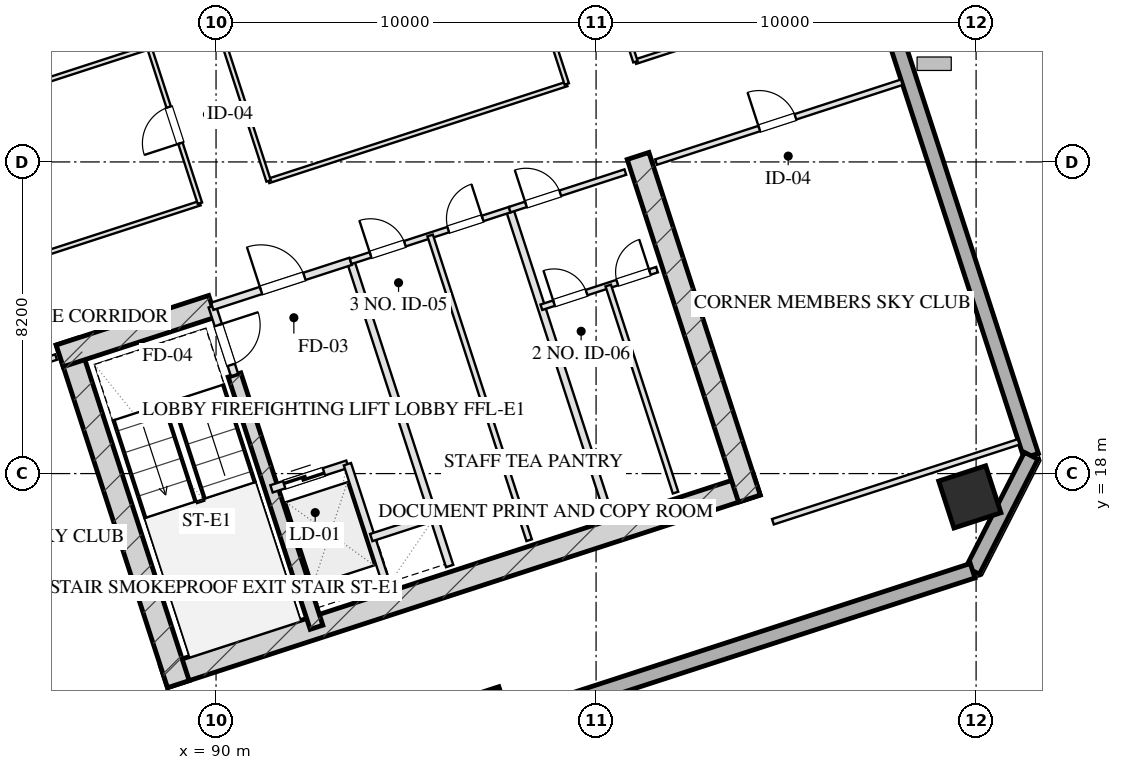
"""IFC4 building model, lengths in metres.
Left out: names, types, materials, properties, quantities, classifications, styles, units other than length and angle.
Written with IfcOpenShell. Run it as: python <this file> out.ifc"""

import sys

from ifc_helpers import new_model, si_unit, direction, frame, frame_2d, origin, origin_2d, place, context, subcontext, project, spatial, rectangle, hollow_rectangle, extrude, element, fill, save


model = new_model("IFC4")
c1 = context("Model", 3, precision=1e-05, world=origin(), true_north=direction((0.0, 1.0)))
c2 = subcontext(c1, "Body", "Model", "MODEL_VIEW")
j1 = project(units=[si_unit("LENGTHUNIT", "METRE"), si_unit("PLANEANGLEUNIT", "RADIAN")], contexts=[c1])
p1 = place(None, origin())
s1 = spatial("IfcSite", under=j1, at=p1, CompositionType="ELEMENT")
p2 = place(p1, origin())
s2 = spatial("IfcBuilding", under=s1, at=p2, CompositionType="ELEMENT")
p3 = place(p2, frame((0.0, 0.0, 152.95)))
s3 = spatial("IfcBuildingStorey", under=s2, at=p3, CompositionType="ELEMENT", Elevation=152.95)
p4 = place(p3, frame((88.63, 12.652, 0.0), z_axis=(0.0, 0.0, 1.0), x_axis=(0.95105714907, 0.309015046886, 0.0)))
e1 = element("IfcWall", 1, at=p4, inside=s3, PredefinedType="SHEAR", context=c2, shape_type="SweptSolid", body=[
    extrude(rectangle(XDim=16.4, YDim=0.6, at=frame_2d((8.2, 0.0))), origin(), (0.0, 0.0, 1.0), 3.45),
])
p5 = place(p3, frame((86.078, 21.475, 0.0), z_axis=(0.0, 0.0, 1.0), x_axis=(0.309017938678, -0.951056209472, 0.0)))
e2 = element("IfcWall", 2, at=p5, inside=s3, PredefinedType="SHEAR", context=c2, shape_type="SweptSolid", body=[
    extrude(rectangle(XDim=9.48, YDim=0.6, at=frame_2d((4.74, 0.0))), origin(), (0.0, 0.0, 1.0), 3.45),
])
p6 = place(p3, frame((101.105, 26.358, 0.0), z_axis=(0.0, 0.0, 1.0), x_axis=(0.309010370028, -0.95105866865, 0.0)))
e3 = element("IfcWall", 3, at=p6, inside=s3, PredefinedType="SHEAR", context=c2, shape_type="SweptSolid", body=[
    extrude(rectangle(XDim=9.48, YDim=0.6, at=frame_2d((4.74, 0.0))), origin(), (0.0, 0.0, 1.0), 3.45),
])
p7 = place(p3, frame((90.486, 20.594, 0.0), z_axis=(0.0, 0.0, 1.0), x_axis=(0.309020428229, -0.951055400562, 0.0)))
e4 = element("IfcWall", 4, at=p7, inside=s3, PredefinedType="SHEAR", context=c2, shape_type="SweptSolid", body=[
    extrude(rectangle(XDim=6.98, YDim=0.35, at=frame_2d((3.49, 0.0))), origin(), (0.0, 0.0, 1.0), 3.45),
])
p8 = place(p3, frame((85.886, 21.097, 0.0), z_axis=(0.0, 0.0, 1.0), x_axis=(0.951068073652, 0.308981422225, 0.0)))
e5 = element("IfcWall", 5, at=p8, inside=s3, PredefinedType="SHEAR", context=c2, shape_type="SweptSolid", body=[
    extrude(rectangle(XDim=4.22, YDim=0.6, at=frame_2d((2.11, 0.0))), origin(), (0.0, 0.0, 1.0), 3.45),
])
p9 = place(p3, frame((109.835, 17.386, 0.0), z_axis=(0.0, 0.0, 1.0), x_axis=(0.951056516295, 0.309016994375, 0.0)))
e6 = element("IfcColumn", 6, at=p9, inside=s3, PredefinedType="COLUMN", context=c2, shape_type="SweptSolid", body=[
    extrude(hollow_rectangle(XDim=1.3, YDim=1.3, WallThickness=0.045, at=origin_2d()), origin(), (0.0, 0.0, 1.0), 3.451),
])
p10 = place(p3, frame((97.185, 11.888, 0.0), z_axis=(0.0, 0.0, 1.0), x_axis=(0.951056516295, 0.309016994375, 0.0)))
e7 = element("IfcColumn", 7, at=p10, inside=s3, PredefinedType="COLUMN", context=c2, shape_type="SweptSolid", body=[
    extrude(hollow_rectangle(XDim=0.8, YDim=0.8, WallThickness=0.028, at=origin_2d()), origin(), (0.0, 0.0, 1.0), 3.451),
])
p11 = place(p3, frame((98.224, 59.173, 0.0), z_axis=(0.0, 0.0, 1.0), x_axis=(0.309014228706, -0.951057414911, 0.0)))
e8 = element("IfcWall", 8, at=p11, inside=s3, PredefinedType="SOLIDWALL", context=c2, shape_type="SweptSolid", body=[
    extrude(rectangle(XDim=42.8, YDim=0.4, at=frame_2d((21.4, 0.0))), origin(), (0.0, 0.0, 1.0), 2.61),
])
p12 = place(p11, frame((23.95, 0.0, 0.0)))
e9 = element("IfcOpeningElement", 9, at=p12, cuts=e8, PredefinedType="OPENING", context=c2, shape_type="SweptSolid", body=[
    extrude(rectangle(XDim=1.1, YDim=2.15, at=frame_2d((0.55, 1.075))), frame((0.0, 0.21, 0.0), z_axis=(0.0, -1.0, 0.0), x_axis=(1.0, 0.0, 0.0)), (0.0, 0.0, 1.0), 0.42),
])
p13 = place(p3, frame((111.449, 18.468, 0.0), z_axis=(0.0, 0.0, 1.0), x_axis=(-0.454019523198, -0.890991735402, 0.0)))
e10 = element("IfcWall", 10, at=p13, inside=s3, PredefinedType="SOLIDWALL", context=c2, shape_type="SweptSolid", body=[
    extrude(rectangle(XDim=3.394, YDim=0.4, at=frame_2d((1.697, 0.0))), origin(), (0.0, 0.0, 1.0), 2.61),
])
p14 = place(p3, frame((109.908, 15.444, 0.0), z_axis=(0.0, 0.0, 1.0), x_axis=(-0.951057580055, -0.30901372044, 0.0)))
e11 = element("IfcWall", 11, at=p14, inside=s3, PredefinedType="SOLIDWALL", context=c2, shape_type="SweptSolid", body=[
    extrude(rectangle(XDim=26.4, YDim=0.4, at=frame_2d((13.2, 0.0))), origin(), (0.0, 0.0, 1.0), 2.61),
])
p15 = place(p3, frame((89.899, 22.401, 0.0), z_axis=(0.0, 0.0, 1.0), x_axis=(0.308932062672, -0.951084108086, 0.0)))
e12 = element("IfcWall", 12, at=p15, inside=s3, PredefinedType="PARTITIONING", context=c2, shape_type="SweptSolid", body=[
    extrude(rectangle(XDim=1.9, YDim=0.2, at=frame_2d((0.95, 0.0))), origin(), (0.0, 0.0, 1.0), 3.175),
])
p16 = place(p15, frame((0.52, 0.0, 0.0)))
e13 = element("IfcOpeningElement", 13, at=p16, cuts=e12, PredefinedType="OPENING", context=c2, shape_type="SweptSolid", body=[
    extrude(rectangle(XDim=1.1, YDim=2.05, at=frame_2d((0.55, 1.025))), frame((0.0, 0.11, 0.0), z_axis=(0.0, -1.0, 0.0), x_axis=(1.0, 0.0, 0.0)), (0.0, 0.0, 1.0), 0.22),
])
p17 = place(p3, frame((93.542, 23.585, 0.0), z_axis=(0.0, 0.0, 1.0), x_axis=(0.309042196757, -0.951048327176, 0.0)))
e14 = element("IfcWall", 14, at=p17, inside=s3, PredefinedType="PARTITIONING", context=c2, shape_type="SweptSolid", body=[
    extrude(rectangle(XDim=8.43, YDim=0.2, at=frame_2d((4.215, 0.0))), origin(), (0.0, 0.0, 1.0), 3.175),
])
p18 = place(p3, frame((89.899, 22.401, 0.0), z_axis=(0.0, 0.0, 1.0), x_axis=(0.951046716504, 0.309047153403, 0.0)))
e15 = element("IfcWall", 15, at=p18, inside=s3, PredefinedType="PARTITIONING", context=c2, shape_type="SweptSolid", body=[
    extrude(rectangle(XDim=3.83, YDim=0.2, at=frame_2d((1.915, 0.0))), origin(), (0.0, 0.0, 1.0), 3.175),
])
p19 = place(p18, frame((1.35, 0.0, 0.0)))
e16 = element("IfcOpeningElement", 16, at=p19, cuts=e15, PredefinedType="OPENING", context=c2, shape_type="SweptSolid", body=[
    extrude(rectangle(XDim=1.2, YDim=2.05, at=frame_2d((0.6, 1.025))), frame((0.0, 0.11, 0.0), z_axis=(0.0, -1.0, 0.0), x_axis=(1.0, 0.0, 0.0)), (0.0, 0.0, 1.0), 0.22),
])
p20 = place(p3, frame((91.46, 17.598, 0.0), z_axis=(0.0, 0.0, 1.0), x_axis=(0.951062257173, 0.308999325213, 0.0)))
e17 = element("IfcWall", 17, at=p20, inside=s3, PredefinedType="PARTITIONING", context=c2, shape_type="SweptSolid", body=[
    extrude(rectangle(XDim=2.1, YDim=0.2, at=frame_2d((1.05, 0.0))), origin(), (0.0, 0.0, 1.0), 3.175),
])
p21 = place(p20, frame((0.35, 0.0, 0.0)))
e18 = element("IfcOpeningElement", 18, at=p21, cuts=e17, PredefinedType="OPENING", context=c2, shape_type="SweptSolid", body=[
    extrude(rectangle(XDim=1.1, YDim=2.05, at=frame_2d((0.55, 1.025))), frame((0.0, 0.11, 0.0), z_axis=(0.0, -1.0, 0.0), x_axis=(1.0, 0.0, 0.0)), (0.0, 0.0, 1.0), 0.22),
])
p22 = place(p3, frame((93.457, 18.247, 0.0), z_axis=(0.0, 0.0, 1.0), x_axis=(0.3089935693, -0.951064127245, 0.0)))
e19 = element("IfcWall", 19, at=p22, inside=s3, PredefinedType="PARTITIONING", context=c2, shape_type="SweptSolid", body=[
    extrude(rectangle(XDim=3.7, YDim=0.2, at=frame_2d((1.85, 0.0))), origin(), (0.0, 0.0, 1.0), 3.175),
])
p23 = place(p3, frame((94.084, 16.317, 0.0), z_axis=(0.0, 0.0, 1.0), x_axis=(0.951041328149, 0.309063734775, 0.0)))
e20 = element("IfcWall", 20, at=p23, inside=s3, PredefinedType="PARTITIONING", context=c2, shape_type="SweptSolid", body=[
    extrude(rectangle(XDim=1.73, YDim=0.2, at=frame_2d((0.865, 0.0))), origin(), (0.0, 0.0, 1.0), 3.175),
])
p24 = place(p3, frame((97.727, 24.944, 0.0), z_axis=(0.0, 0.0, 1.0), x_axis=(0.309016001439, -0.951056838919, 0.0)))
e21 = element("IfcWall", 21, at=p24, inside=s3, PredefinedType="PARTITIONING", context=c2, shape_type="SweptSolid", body=[
    extrude(rectangle(XDim=8.43, YDim=0.2, at=frame_2d((4.215, 0.0))), origin(), (0.0, 0.0, 1.0), 3.175),
])
p25 = place(p3, frame((93.542, 23.585, 0.0), z_axis=(0.0, 0.0, 1.0), x_axis=(0.951063829732, 0.308994485023, 0.0)))
e22 = element("IfcWall", 22, at=p25, inside=s3, PredefinedType="PARTITIONING", context=c2, shape_type="SweptSolid", body=[
    extrude(rectangle(XDim=4.4, YDim=0.15, at=frame_2d((2.2, 0.0))), origin(), (0.0, 0.0, 1.0), 3.175),
])
p26 = place(p25, frame((0.55, 0.0, 0.0)))
e23 = element("IfcOpeningElement", 23, at=p26, cuts=e22, PredefinedType="OPENING", context=c2, shape_type="SweptSolid", body=[
    extrude(rectangle(XDim=0.95, YDim=2.05, at=frame_2d((0.475, 1.025))), frame((0.0, 0.085, 0.0), z_axis=(0.0, -1.0, 0.0), x_axis=(1.0, 0.0, 0.0)), (0.0, 0.0, 1.0), 0.17),
])
p27 = place(p25, frame((2.7, 0.0, 0.0)))
e24 = element("IfcOpeningElement", 24, at=p27, cuts=e22, PredefinedType="OPENING", context=c2, shape_type="SweptSolid", body=[
    extrude(rectangle(XDim=0.95, YDim=2.05, at=frame_2d((0.475, 1.025))), frame((0.0, 0.085, 0.0), z_axis=(0.0, -1.0, 0.0), x_axis=(1.0, 0.0, 0.0)), (0.0, 0.0, 1.0), 0.17),
])
p28 = place(p3, frame((95.634, 24.265, 0.0), z_axis=(0.0, 0.0, 1.0), x_axis=(0.309007490203, -0.951059604335, 0.0)))
e25 = element("IfcWall", 25, at=p28, inside=s3, PredefinedType="PARTITIONING", context=c2, shape_type="SweptSolid", body=[
    extrude(rectangle(XDim=8.43, YDim=0.15, at=frame_2d((4.215, 0.0))), origin(), (0.0, 0.0, 1.0), 3.175),
])
p29 = place(p3, frame((97.727, 24.944, 0.0), z_axis=(0.0, 0.0, 1.0), x_axis=(0.951036872128, 0.309077446369, 0.0)))
e26 = element("IfcWall", 26, at=p29, inside=s3, PredefinedType="PARTITIONING", context=c2, shape_type="SweptSolid", body=[
    extrude(rectangle(XDim=3.2, YDim=0.15, at=frame_2d((1.6, 0.0))), origin(), (0.0, 0.0, 1.0), 3.175),
])
p30 = place(p29, frame((0.45, 0.0, 0.0)))
e27 = element("IfcOpeningElement", 27, at=p30, cuts=e26, PredefinedType="OPENING", context=c2, shape_type="SweptSolid", body=[
    extrude(rectangle(XDim=0.95, YDim=2.05, at=frame_2d((0.475, 1.025))), frame((0.0, 0.085, 0.0), z_axis=(0.0, -1.0, 0.0), x_axis=(1.0, 0.0, 0.0)), (0.0, 0.0, 1.0), 0.17),
])
p31 = place(p3, frame((98.561, 22.376, 0.0), z_axis=(0.0, 0.0, 1.0), x_axis=(0.95104415986, 0.309055020985, 0.0)))
e28 = element("IfcWall", 28, at=p31, inside=s3, PredefinedType="PARTITIONING", context=c2, shape_type="SweptSolid", body=[
    extrude(rectangle(XDim=3.2, YDim=0.15, at=frame_2d((1.6, 0.0))), origin(), (0.0, 0.0, 1.0), 3.175),
])
p32 = place(p31, frame((0.35, 0.0, 0.0)))
e29 = element("IfcOpeningElement", 29, at=p32, cuts=e28, PredefinedType="OPENING", context=c2, shape_type="SweptSolid", body=[
    extrude(rectangle(XDim=0.9, YDim=2.05, at=frame_2d((0.45, 1.025))), frame((0.0, 0.085, 0.0), z_axis=(0.0, -1.0, 0.0), x_axis=(1.0, 0.0, 0.0)), (0.0, 0.0, 1.0), 0.17),
])
p33 = place(p31, frame((2.1, 0.0, 0.0)))
e30 = element("IfcOpeningElement", 30, at=p33, cuts=e28, PredefinedType="OPENING", context=c2, shape_type="SweptSolid", body=[
    extrude(rectangle(XDim=0.9, YDim=2.05, at=frame_2d((0.45, 1.025))), frame((0.0, 0.085, 0.0), z_axis=(0.0, -1.0, 0.0), x_axis=(1.0, 0.0, 0.0)), (0.0, 0.0, 1.0), 0.17),
])
p34 = place(p3, frame((100.32, 22.948, 0.0), z_axis=(0.0, 0.0, 1.0), x_axis=(0.309035009867, -0.951050662518, 0.0)))
e31 = element("IfcWall", 31, at=p34, inside=s3, PredefinedType="PARTITIONING", context=c2, shape_type="SweptSolid", body=[
    extrude(rectangle(XDim=5.73, YDim=0.15, at=frame_2d((2.865, 0.0))), origin(), (0.0, 0.0, 1.0), 3.175),
])
p35 = place(p3, frame((78.753, 18.78, 0.0), z_axis=(0.0, 0.0, 1.0), x_axis=(0.951060977215, 0.309003264738, 0.0)))
e32 = element("IfcWall", 32, at=p35, inside=s3, PredefinedType="PARTITIONING", context=c2, shape_type="SweptSolid", body=[
    extrude(rectangle(XDim=7.4, YDim=0.15, at=frame_2d((3.7, 0.0))), origin(), (0.0, 0.0, 1.0), 3.175),
])
p36 = place(p35, frame((3.108, 0.0, 0.0)))
e33 = element("IfcOpeningElement", 33, at=p36, cuts=e32, PredefinedType="OPENING", context=c2, shape_type="SweptSolid", body=[
    extrude(rectangle(XDim=1.0, YDim=2.05, at=frame_2d((0.5, 1.025))), frame((0.0, 0.085, 0.0), z_axis=(0.0, -1.0, 0.0), x_axis=(1.0, 0.0, 0.0)), (0.0, 0.0, 1.0), 0.17),
])
p37 = place(p3, frame((104.653, 16.733, 0.0), z_axis=(0.0, 0.0, 1.0), x_axis=(0.951054383043, 0.309023559774, 0.0)))
e34 = element("IfcWall", 34, at=p37, inside=s3, PredefinedType="PARTITIONING", context=c2, shape_type="SweptSolid", body=[
    extrude(rectangle(XDim=6.8, YDim=0.15, at=frame_2d((3.4, 0.0))), origin(), (0.0, 0.0, 1.0), 3.175),
])
p38 = place(p3, frame((101.578, 26.196, 0.0), z_axis=(0.0, 0.0, 1.0), x_axis=(0.951064934653, 0.308991084134, 0.0)))
e35 = element("IfcWall", 35, at=p38, inside=s3, PredefinedType="PARTITIONING", context=c2, shape_type="SweptSolid", body=[
    extrude(rectangle(XDim=6.8, YDim=0.15, at=frame_2d((3.4, 0.0))), origin(), (0.0, 0.0, 1.0), 3.175),
])
p39 = place(p38, frame((2.856, 0.0, 0.0)))
e36 = element("IfcOpeningElement", 36, at=p39, cuts=e35, PredefinedType="OPENING", context=c2, shape_type="SweptSolid", body=[
    extrude(rectangle(XDim=1.0, YDim=2.05, at=frame_2d((0.5, 1.025))), frame((0.0, 0.085, 0.0), z_axis=(0.0, -1.0, 0.0), x_axis=(1.0, 0.0, 0.0)), (0.0, 0.0, 1.0), 0.17),
])
p40 = place(p3, frame((77.925, 21.328, 0.0), z_axis=(0.0, 0.0, 1.0), x_axis=(0.95105749975, 0.309013967595, 0.0)))
e37 = element("IfcWall", 37, at=p40, inside=s3, PredefinedType="PARTITIONING", context=c2, shape_type="SweptSolid", body=[
    extrude(rectangle(XDim=12.25, YDim=0.12, at=frame_2d((6.125, 0.0))), origin(), (0.0, 0.0, 1.0), 3.175),
])
p41 = place(p3, frame((91.382, 25.701, 0.0), z_axis=(0.0, 0.0, 1.0), x_axis=(0.951061683147, 0.309001091988, 0.0)))
e38 = element("IfcWall", 38, at=p41, inside=s3, PredefinedType="PARTITIONING", context=c2, shape_type="SweptSolid", body=[
    extrude(rectangle(XDim=8.25, YDim=0.12, at=frame_2d((4.125, 0.0))), origin(), (0.0, 0.0, 1.0), 3.175),
])
p42 = place(p3, frame((101.035, 28.837, 0.0), z_axis=(0.0, 0.0, 1.0), x_axis=(0.95104869662, 0.309041059824, 0.0)))
e39 = element("IfcWall", 39, at=p42, inside=s3, PredefinedType="PARTITIONING", context=c2, shape_type="SweptSolid", body=[
    extrude(rectangle(XDim=6.5, YDim=0.12, at=frame_2d((3.25, 0.0))), origin(), (0.0, 0.0, 1.0), 3.175),
])
p43 = place(p3, frame((89.575, 25.114, 0.0), z_axis=(0.0, 0.0, 1.0), x_axis=(-0.30901773025, 0.951056277195, 0.0)))
e40 = element("IfcWall", 40, at=p43, inside=s3, PredefinedType="PARTITIONING", context=c2, shape_type="SweptSolid", body=[
    extrude(rectangle(XDim=16.64, YDim=0.12, at=frame_2d((8.32, 0.0))), origin(), (0.0, 0.0, 1.0), 3.175),
])
p44 = place(p43, frame((1.66, 0.0, 0.0)))
e41 = element("IfcOpeningElement", 41, at=p44, cuts=e40, PredefinedType="OPENING", context=c2, shape_type="SweptSolid", body=[
    extrude(rectangle(XDim=1.0, YDim=2.05, at=frame_2d((0.5, 1.025))), frame((0.0, 0.07, 0.0), z_axis=(0.0, -1.0, 0.0), x_axis=(1.0, 0.0, 0.0)), (0.0, 0.0, 1.0), 0.14),
])
p45 = place(p43, frame((7.82, 0.0, 0.0)))
e42 = element("IfcOpeningElement", 42, at=p45, cuts=e40, PredefinedType="OPENING", context=c2, shape_type="SweptSolid", body=[
    extrude(rectangle(XDim=1.05, YDim=2.05, at=frame_2d((0.525, 1.025))), frame((0.0, 0.07, 0.0), z_axis=(0.0, -1.0, 0.0), x_axis=(1.0, 0.0, 0.0)), (0.0, 0.0, 1.0), 0.14),
])
p46 = place(p43, frame((13.98, 0.0, 0.0)))
e43 = element("IfcOpeningElement", 43, at=p46, cuts=e40, PredefinedType="OPENING", context=c2, shape_type="SweptSolid", body=[
    extrude(rectangle(XDim=1.0, YDim=2.05, at=frame_2d((0.5, 1.025))), frame((0.0, 0.07, 0.0), z_axis=(0.0, -1.0, 0.0), x_axis=(1.0, 0.0, 0.0)), (0.0, 0.0, 1.0), 0.14),
])
p47 = place(p3, frame((91.382, 25.701, 0.0), z_axis=(0.0, 0.0, 1.0), x_axis=(-0.309004459387, 0.951060589068, 0.0)))
e44 = element("IfcWall", 44, at=p47, inside=s3, PredefinedType="PARTITIONING", context=c2, shape_type="SweptSolid", body=[
    extrude(rectangle(XDim=16.64, YDim=0.12, at=frame_2d((8.32, 0.0))), origin(), (0.0, 0.0, 1.0), 3.175),
])
p48 = place(p47, frame((7.987, 0.0, 0.0)))
e45 = element("IfcOpeningElement", 45, at=p48, cuts=e44, PredefinedType="OPENING", context=c2, shape_type="SweptSolid", body=[
    extrude(rectangle(XDim=1.1, YDim=2.05, at=frame_2d((0.55, 1.025))), frame((0.0, 0.07, 0.0), z_axis=(0.0, -1.0, 0.0), x_axis=(1.0, 0.0, 0.0)), (0.0, 0.0, 1.0), 0.14),
])
p49 = place(p3, frame((99.229, 28.25, 0.0), z_axis=(0.0, 0.0, 1.0), x_axis=(-0.30901773025, 0.951056277195, 0.0)))
e46 = element("IfcWall", 46, at=p49, inside=s3, PredefinedType="PARTITIONING", context=c2, shape_type="SweptSolid", body=[
    extrude(rectangle(XDim=16.64, YDim=0.12, at=frame_2d((8.32, 0.0))), origin(), (0.0, 0.0, 1.0), 3.175),
])
p50 = place(p3, frame((101.035, 28.837, 0.0), z_axis=(0.0, 0.0, 1.0), x_axis=(-0.30901773025, 0.951056277195, 0.0)))
e47 = element("IfcWall", 47, at=p50, inside=s3, PredefinedType="PARTITIONING", context=c2, shape_type="SweptSolid", body=[
    extrude(rectangle(XDim=16.64, YDim=0.12, at=frame_2d((8.32, 0.0))), origin(), (0.0, 0.0, 1.0), 3.175),
])
p51 = place(p50, frame((1.16, 0.0, 0.0)))
e48 = element("IfcOpeningElement", 48, at=p51, cuts=e47, PredefinedType="OPENING", context=c2, shape_type="SweptSolid", body=[
    extrude(rectangle(XDim=1.0, YDim=2.05, at=frame_2d((0.5, 1.025))), frame((0.0, 0.07, 0.0), z_axis=(0.0, -1.0, 0.0), x_axis=(1.0, 0.0, 0.0)), (0.0, 0.0, 1.0), 0.14),
])
p52 = place(p50, frame((4.72, 0.0, 0.0)))
e49 = element("IfcOpeningElement", 49, at=p52, cuts=e47, PredefinedType="OPENING", context=c2, shape_type="SweptSolid", body=[
    extrude(rectangle(XDim=1.0, YDim=2.05, at=frame_2d((0.5, 1.025))), frame((0.0, 0.07, 0.0), z_axis=(0.0, -1.0, 0.0), x_axis=(1.0, 0.0, 0.0)), (0.0, 0.0, 1.0), 0.14),
])
p53 = place(p50, frame((7.82, 0.0, 0.0)))
e50 = element("IfcOpeningElement", 50, at=p53, cuts=e47, PredefinedType="OPENING", context=c2, shape_type="SweptSolid", body=[
    extrude(rectangle(XDim=1.0, YDim=2.05, at=frame_2d((0.5, 1.025))), frame((0.0, 0.07, 0.0), z_axis=(0.0, -1.0, 0.0), x_axis=(1.0, 0.0, 0.0)), (0.0, 0.0, 1.0), 0.14),
])
p54 = place(p50, frame((10.671, 0.0, 0.0)))
e51 = element("IfcOpeningElement", 51, at=p54, cuts=e47, PredefinedType="OPENING", context=c2, shape_type="SweptSolid", body=[
    extrude(rectangle(XDim=1.0, YDim=2.05, at=frame_2d((0.5, 1.025))), frame((0.0, 0.07, 0.0), z_axis=(0.0, -1.0, 0.0), x_axis=(1.0, 0.0, 0.0)), (0.0, 0.0, 1.0), 0.14),
])
p55 = place(p50, frame((13.971, 0.0, 0.0)))
e52 = element("IfcOpeningElement", 52, at=p55, cuts=e47, PredefinedType="OPENING", context=c2, shape_type="SweptSolid", body=[
    extrude(rectangle(XDim=1.05, YDim=2.05, at=frame_2d((0.525, 1.025))), frame((0.0, 0.07, 0.0), z_axis=(0.0, -1.0, 0.0), x_axis=(1.0, 0.0, 0.0)), (0.0, 0.0, 1.0), 0.14),
])
p56 = place(p3, frame((76.59, 25.437, 0.0), z_axis=(0.0, 0.0, 1.0), x_axis=(0.95105749975, 0.309013967595, 0.0)))
e53 = element("IfcWall", 53, at=p56, inside=s3, PredefinedType="PARTITIONING", context=c2, shape_type="SweptSolid", body=[
    extrude(rectangle(XDim=12.25, YDim=0.12, at=frame_2d((6.125, 0.0))), origin(), (0.0, 0.0, 1.0), 3.175),
])
p57 = place(p16, origin())
e54 = element("IfcDoor", 54, at=p57, inside=s3, OperationType="SINGLE_SWING_LEFT", PredefinedType="DOOR", context=c2, shape_type="SweptSolid", body=[
    extrude(rectangle(XDim=1.1, YDim=2.05, at=frame_2d((0.55, 1.025))), frame((0.0, 0.025, 0.0), z_axis=(0.0, -1.0, 0.0), x_axis=(1.0, 0.0, 0.0)), (0.0, 0.0, 1.0), 0.05),
])
fill(e13, e54)
p58 = place(p19, origin())
e55 = element("IfcDoor", 55, at=p58, inside=s3, OperationType="SINGLE_SWING_LEFT", PredefinedType="DOOR", context=c2, shape_type="SweptSolid", body=[
    extrude(rectangle(XDim=1.2, YDim=2.05, at=frame_2d((0.6, 1.025))), frame((0.0, 0.025, 0.0), z_axis=(0.0, -1.0, 0.0), x_axis=(1.0, 0.0, 0.0)), (0.0, 0.0, 1.0), 0.05),
])
fill(e16, e55)
p59 = place(p21, origin())
e56 = element("IfcDoor", 56, at=p59, inside=s3, OperationType="DOUBLE_DOOR_SLIDING", PredefinedType="DOOR", context=c2, shape_type="SweptSolid", body=[
    extrude(rectangle(XDim=1.1, YDim=2.05, at=frame_2d((0.55, 1.025))), frame((0.0, 0.025, 0.0), z_axis=(0.0, -1.0, 0.0), x_axis=(1.0, 0.0, 0.0)), (0.0, 0.0, 1.0), 0.05),
])
fill(e18, e56)
p60 = place(p26, origin())
e57 = element("IfcDoor", 57, at=p60, inside=s3, OperationType="SINGLE_SWING_LEFT", PredefinedType="DOOR", context=c2, shape_type="SweptSolid", body=[
    extrude(rectangle(XDim=0.95, YDim=2.05, at=frame_2d((0.475, 1.025))), frame((0.0, 0.025, 0.0), z_axis=(0.0, -1.0, 0.0), x_axis=(1.0, 0.0, 0.0)), (0.0, 0.0, 1.0), 0.05),
])
fill(e23, e57)
p61 = place(p27, origin())
e58 = element("IfcDoor", 58, at=p61, inside=s3, OperationType="SINGLE_SWING_RIGHT", PredefinedType="DOOR", context=c2, shape_type="SweptSolid", body=[
    extrude(rectangle(XDim=0.95, YDim=2.05, at=frame_2d((0.475, 1.025))), frame((0.0, 0.025, 0.0), z_axis=(0.0, -1.0, 0.0), x_axis=(1.0, 0.0, 0.0)), (0.0, 0.0, 1.0), 0.05),
])
fill(e24, e58)
p62 = place(p30, origin())
e59 = element("IfcDoor", 59, at=p62, inside=s3, OperationType="SINGLE_SWING_LEFT", PredefinedType="DOOR", context=c2, shape_type="SweptSolid", body=[
    extrude(rectangle(XDim=0.95, YDim=2.05, at=frame_2d((0.475, 1.025))), frame((0.0, 0.025, 0.0), z_axis=(0.0, -1.0, 0.0), x_axis=(1.0, 0.0, 0.0)), (0.0, 0.0, 1.0), 0.05),
])
fill(e27, e59)
p63 = place(p32, origin())
e60 = element("IfcDoor", 60, at=p63, inside=s3, OperationType="SINGLE_SWING_LEFT", PredefinedType="DOOR", context=c2, shape_type="SweptSolid", body=[
    extrude(rectangle(XDim=0.9, YDim=2.05, at=frame_2d((0.45, 1.025))), frame((0.0, 0.025, 0.0), z_axis=(0.0, -1.0, 0.0), x_axis=(1.0, 0.0, 0.0)), (0.0, 0.0, 1.0), 0.05),
])
fill(e29, e60)
p64 = place(p33, origin())
e61 = element("IfcDoor", 61, at=p64, inside=s3, OperationType="SINGLE_SWING_RIGHT", PredefinedType="DOOR", context=c2, shape_type="SweptSolid", body=[
    extrude(rectangle(XDim=0.9, YDim=2.05, at=frame_2d((0.45, 1.025))), frame((0.0, 0.025, 0.0), z_axis=(0.0, -1.0, 0.0), x_axis=(1.0, 0.0, 0.0)), (0.0, 0.0, 1.0), 0.05),
])
fill(e30, e61)
p65 = place(p39, origin())
e62 = element("IfcDoor", 62, at=p65, inside=s3, OperationType="SINGLE_SWING_LEFT", PredefinedType="DOOR", context=c2, shape_type="SweptSolid", body=[
    extrude(rectangle(XDim=1.0, YDim=2.05, at=frame_2d((0.5, 1.025))), frame((0.0, 0.025, 0.0), z_axis=(0.0, -1.0, 0.0), x_axis=(1.0, 0.0, 0.0)), (0.0, 0.0, 1.0), 0.05),
])
fill(e36, e62)
p66 = place(p44, origin())
e63 = element("IfcDoor", 63, at=p66, inside=s3, OperationType="SINGLE_SWING_LEFT", PredefinedType="DOOR", context=c2, shape_type="SweptSolid", body=[
    extrude(rectangle(XDim=1.0, YDim=2.05, at=frame_2d((0.5, 1.025))), frame((0.0, 0.025, 0.0), z_axis=(0.0, -1.0, 0.0), x_axis=(1.0, 0.0, 0.0)), (0.0, 0.0, 1.0), 0.05),
])
fill(e41, e63)
save(model, sys.argv[1])
